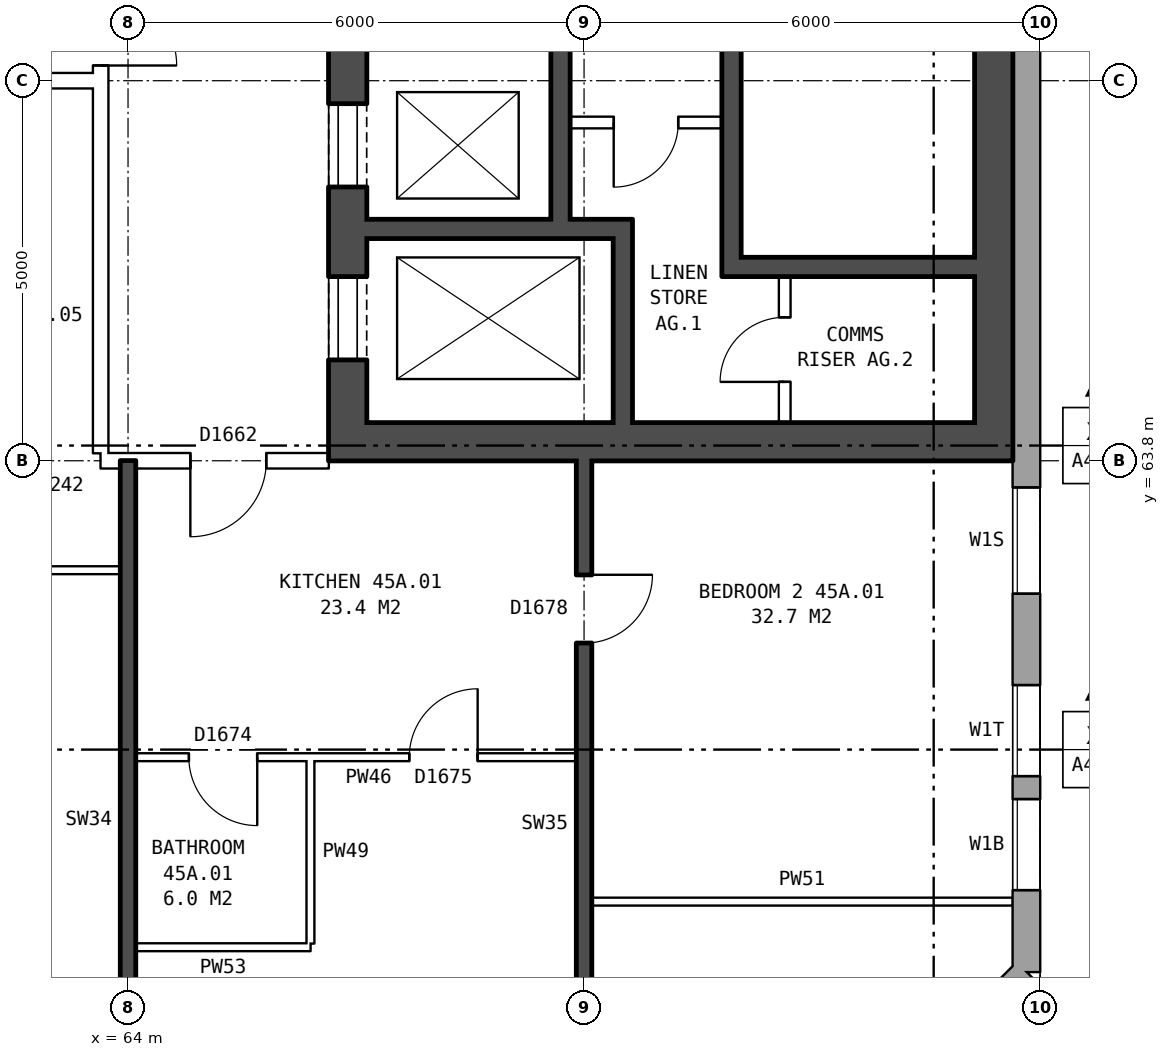
"""IFC4 building model, lengths in metres.
Left out: names, types, materials, properties, quantities, classifications, styles, units other than length and angle.
Written with IfcOpenShell. Run it as: python <this file> out.ifc"""

import sys

from ifc_helpers import new_model, si_unit, direction, frame, frame_2d, origin, place, context, subcontext, project, spatial, rectangle, extrude, element, fill, save


model = new_model("IFC4")
c1 = context("Model", 3, precision=1e-05, world=origin(), true_north=direction((0.0, 1.0)))
c2 = subcontext(c1, "Body", "Model", "MODEL_VIEW")
j1 = project(units=[si_unit("LENGTHUNIT", "METRE"), si_unit("PLANEANGLEUNIT", "RADIAN")], contexts=[c1])
p1 = place(None, origin())
s1 = spatial("IfcSite", under=j1, at=p1, CompositionType="ELEMENT")
p2 = place(p1, origin())
s2 = spatial("IfcBuilding", under=s1, at=p2, CompositionType="ELEMENT")
p3 = place(p2, frame((0.0, 0.0, 160.9)))
s3 = spatial("IfcBuildingStorey", under=s2, at=p3, CompositionType="ELEMENT", Elevation=160.9)
p4 = place(p3, frame((72.925, 54.18, 0.0), z_axis=(0.0, 0.0, 1.0), x_axis=(0.707106781187, 0.707106781187, 0.0)))
e1 = element("IfcWall", 1, at=p4, inside=s3, PredefinedType="STANDARD", context=c2, shape_type="SweptSolid", body=[
    extrude(rectangle(XDim=4.094, YDim=0.36, at=frame_2d((2.047, 0.0))), origin(), (0.0, 0.0, 1.0), 2.85),
])
p5 = place(p4, frame((1.247, 0.0, 0.8)))
e2 = element("IfcOpeningElement", 2, at=p5, cuts=e1, PredefinedType="OPENING", context=c2, shape_type="SweptSolid", body=[
    extrude(rectangle(XDim=1.6, YDim=1.8, at=frame_2d((0.8, 0.9))), frame((0.0, 0.19, 0.0), z_axis=(0.0, -1.0, 0.0), x_axis=(1.0, 0.0, 0.0)), (0.0, 0.0, 1.0), 0.38),
])
p6 = place(p3, frame((75.82, 57.075, 0.0), z_axis=(0.0, 0.0, 1.0), x_axis=(0.0, 1.0, 0.0)))
e3 = element("IfcWall", 3, at=p6, inside=s3, PredefinedType="STANDARD", context=c2, shape_type="SweptSolid", body=[
    extrude(rectangle(XDim=25.851, YDim=0.36, at=frame_2d((12.925, 0.0))), origin(), (0.0, 0.0, 1.0), 2.85),
])
p7 = place(p6, frame((1.075, 0.0, 0.8)))
e4 = element("IfcOpeningElement", 4, at=p7, cuts=e3, PredefinedType="OPENING", context=c2, shape_type="SweptSolid", body=[
    extrude(rectangle(XDim=1.2, YDim=1.8, at=frame_2d((0.6, 0.9))), frame((0.0, 0.19, 0.0), z_axis=(0.0, -1.0, 0.0), x_axis=(1.0, 0.0, 0.0)), (0.0, 0.0, 1.0), 0.38),
])
p8 = place(p6, frame((2.575, 0.0, 0.8)))
e5 = element("IfcOpeningElement", 5, at=p8, cuts=e3, PredefinedType="OPENING", context=c2, shape_type="SweptSolid", body=[
    extrude(rectangle(XDim=1.2, YDim=0.9, at=frame_2d((0.6, 0.45))), frame((0.0, 0.19, 0.0), z_axis=(0.0, -1.0, 0.0), x_axis=(1.0, 0.0, 0.0)), (0.0, 0.0, 1.0), 0.38),
])
p9 = place(p6, frame((19.475, 0.0, 1.7)))
e6 = element("IfcOpeningElement", 6, at=p9, cuts=e3, PredefinedType="OPENING", context=c2, shape_type="SweptSolid", body=[
    extrude(rectangle(XDim=1.4, YDim=0.9, at=frame_2d((0.7, 0.45))), frame((0.0, 0.19, 0.0), z_axis=(0.0, -1.0, 0.0), x_axis=(1.0, 0.0, 0.0)), (0.0, 0.0, 1.0), 0.38),
])
p10 = place(p6, frame((21.925, 0.0, 0.8)))
e7 = element("IfcOpeningElement", 7, at=p10, cuts=e3, PredefinedType="OPENING", context=c2, shape_type="SweptSolid", body=[
    extrude(rectangle(XDim=1.2, YDim=0.9, at=frame_2d((0.6, 0.45))), frame((0.0, 0.19, 0.0), z_axis=(0.0, -1.0, 0.0), x_axis=(1.0, 0.0, 0.0)), (0.0, 0.0, 1.0), 0.38),
])
p11 = place(p6, frame((4.975, 0.0, 1.7)))
e8 = element("IfcOpeningElement", 8, at=p11, cuts=e3, PredefinedType="OPENING", context=c2, shape_type="SweptSolid", body=[
    extrude(rectangle(XDim=1.4, YDim=0.9, at=frame_2d((0.7, 0.45))), frame((0.0, 0.19, 0.0), z_axis=(0.0, -1.0, 0.0), x_axis=(1.0, 0.0, 0.0)), (0.0, 0.0, 1.0), 0.38),
])
p12 = place(p6, frame((23.475, 0.0, 0.8)))
e9 = element("IfcOpeningElement", 9, at=p12, cuts=e3, PredefinedType="OPENING", context=c2, shape_type="SweptSolid", body=[
    extrude(rectangle(XDim=1.2, YDim=1.8, at=frame_2d((0.6, 0.9))), frame((0.0, 0.19, 0.0), z_axis=(0.0, -1.0, 0.0), x_axis=(1.0, 0.0, 0.0)), (0.0, 0.0, 1.0), 0.38),
])
p13 = place(p3, frame((66.89, 63.8, 0.0), z_axis=(0.0, 0.0, 1.0), x_axis=(0.0, 1.0, 0.0)))
e10 = element("IfcWall", 10, at=p13, inside=s3, PredefinedType="SHEAR", context=c2, shape_type="SweptSolid", body=[
    extrude(rectangle(XDim=12.4, YDim=0.5, at=frame_2d((6.2, 0.0))), origin(), (0.0, 0.0, 1.0), 2.85),
])
p14 = place(p13, frame((1.325, 0.0, 0.0)))
e11 = element("IfcOpeningElement", 11, at=p14, cuts=e10, PredefinedType="OPENING", context=c2, shape_type="SweptSolid", body=[
    extrude(rectangle(XDim=1.1, YDim=2.1, at=frame_2d((0.55, 1.05))), frame((0.0, 0.26, 0.0), z_axis=(0.0, -1.0, 0.0), x_axis=(1.0, 0.0, 0.0)), (0.0, 0.0, 1.0), 0.52),
])
p15 = place(p13, frame((3.6, 0.0, 0.0)))
e12 = element("IfcOpeningElement", 12, at=p15, cuts=e10, PredefinedType="OPENING", context=c2, shape_type="SweptSolid", body=[
    extrude(rectangle(XDim=1.1, YDim=2.1, at=frame_2d((0.55, 1.05))), frame((0.0, 0.26, 0.0), z_axis=(0.0, -1.0, 0.0), x_axis=(1.0, 0.0, 0.0)), (0.0, 0.0, 1.0), 0.52),
])
p16 = place(p13, frame((5.8, 0.0, 0.0)))
e13 = element("IfcOpeningElement", 13, at=p16, cuts=e10, PredefinedType="OPENING", context=c2, shape_type="SweptSolid", body=[
    extrude(rectangle(XDim=1.1, YDim=2.1, at=frame_2d((0.55, 1.05))), frame((0.0, 0.26, 0.0), z_axis=(0.0, -1.0, 0.0), x_axis=(1.0, 0.0, 0.0)), (0.0, 0.0, 1.0), 0.52),
])
p17 = place(p13, frame((8.0, 0.0, 0.0)))
e14 = element("IfcOpeningElement", 14, at=p17, cuts=e10, PredefinedType="OPENING", context=c2, shape_type="SweptSolid", body=[
    extrude(rectangle(XDim=1.1, YDim=2.1, at=frame_2d((0.55, 1.05))), frame((0.0, 0.26, 0.0), z_axis=(0.0, -1.0, 0.0), x_axis=(1.0, 0.0, 0.0)), (0.0, 0.0, 1.0), 0.52),
])
p18 = place(p13, frame((9.9, 0.0, 0.0)))
e15 = element("IfcOpeningElement", 15, at=p18, cuts=e10, PredefinedType="OPENING", context=c2, shape_type="SweptSolid", body=[
    extrude(rectangle(XDim=1.1, YDim=2.1, at=frame_2d((0.55, 1.05))), frame((0.0, 0.26, 0.0), z_axis=(0.0, -1.0, 0.0), x_axis=(1.0, 0.0, 0.0)), (0.0, 0.0, 1.0), 0.52),
])
p19 = place(p3, frame((75.39, 63.8, 0.0), z_axis=(0.0, 0.0, 1.0), x_axis=(0.0, 1.0, 0.0)))
e16 = element("IfcWall", 16, at=p19, inside=s3, PredefinedType="SHEAR", context=c2, shape_type="SweptSolid", body=[
    extrude(rectangle(XDim=12.4, YDim=0.5, at=frame_2d((6.2, 0.0))), origin(), (0.0, 0.0, 1.0), 2.85),
])
p20 = place(p3, frame((67.14, 64.05, 0.0), z_axis=(0.0, 0.0, 1.0), x_axis=(1.0, 0.0, 0.0)))
e17 = element("IfcWall", 17, at=p20, inside=s3, PredefinedType="SHEAR", context=c2, shape_type="SweptSolid", body=[
    extrude(rectangle(XDim=8.0, YDim=0.5, at=frame_2d((4.0, 0.0))), origin(), (0.0, 0.0, 1.0), 2.85),
])
p21 = place(p3, frame((72.065, 66.35, 0.0), z_axis=(0.0, 0.0, 1.0), x_axis=(1.0, 0.0, 0.0)))
e18 = element("IfcWall", 18, at=p21, inside=s3, PredefinedType="SHEAR", context=c2, shape_type="SweptSolid", body=[
    extrude(rectangle(XDim=3.075, YDim=0.25, at=frame_2d((1.538, 0.0))), origin(), (0.0, 0.0, 1.0), 2.85),
])
p22 = place(p3, frame((67.14, 66.85, 0.0), z_axis=(0.0, 0.0, 1.0), x_axis=(1.0, 0.0, 0.0)))
e19 = element("IfcWall", 19, at=p22, inside=s3, PredefinedType="SHEAR", context=c2, shape_type="SweptSolid", body=[
    extrude(rectangle(XDim=3.495, YDim=0.25, at=frame_2d((1.748, 0.0))), origin(), (0.0, 0.0, 1.0), 2.85),
])
p23 = place(p3, frame((69.815, 68.25, 0.0), z_axis=(0.0, 0.0, 1.0), x_axis=(1.0, 0.0, 0.0)))
e20 = element("IfcWall", 20, at=p23, inside=s3, PredefinedType="PARTITIONING", context=c2, shape_type="SweptSolid", body=[
    extrude(rectangle(XDim=2.0, YDim=0.15, at=frame_2d((1.0, 0.0))), origin(), (0.0, 0.0, 1.0), 2.85),
])
p24 = place(p23, frame((0.575, 0.0, 0.0)))
e21 = element("IfcOpeningElement", 21, at=p24, cuts=e20, PredefinedType="OPENING", context=c2, shape_type="SweptSolid", body=[
    extrude(rectangle(XDim=0.85, YDim=2.1, at=frame_2d((0.425, 1.05))), frame((0.0, 0.085, 0.0), z_axis=(0.0, -1.0, 0.0), x_axis=(1.0, 0.0, 0.0)), (0.0, 0.0, 1.0), 0.17),
])
p25 = place(p3, frame((69.69, 66.975, 0.0), z_axis=(0.0, 0.0, 1.0), x_axis=(0.0, 1.0, 0.0)))
e22 = element("IfcWall", 22, at=p25, inside=s3, PredefinedType="SHEAR", context=c2, shape_type="SweptSolid", body=[
    extrude(rectangle(XDim=6.6, YDim=0.25, at=frame_2d((3.3, 0.0))), origin(), (0.0, 0.0, 1.0), 2.85),
])
p26 = place(p3, frame((70.51, 64.3, 0.0), z_axis=(0.0, 0.0, 1.0), x_axis=(0.0, 1.0, 0.0)))
e23 = element("IfcWall", 23, at=p26, inside=s3, PredefinedType="SHEAR", context=c2, shape_type="SweptSolid", body=[
    extrude(rectangle(XDim=2.425, YDim=0.25, at=frame_2d((1.212, 0.0))), origin(), (0.0, 0.0, 1.0), 2.85),
])
p27 = place(p3, frame((71.94, 66.225, 0.0), z_axis=(0.0, 0.0, 1.0), x_axis=(0.0, 1.0, 0.0)))
e24 = element("IfcWall", 24, at=p27, inside=s3, PredefinedType="SHEAR", context=c2, shape_type="SweptSolid", body=[
    extrude(rectangle(XDim=7.35, YDim=0.25, at=frame_2d((3.675, 0.0))), origin(), (0.0, 0.0, 1.0), 2.85),
])
p28 = place(p3, frame((72.64, 64.3, 0.0), z_axis=(0.0, 0.0, 1.0), x_axis=(0.0, 1.0, 0.0)))
e25 = element("IfcWall", 25, at=p28, inside=s3, PredefinedType="PARTITIONING", context=c2, shape_type="SweptSolid", body=[
    extrude(rectangle(XDim=1.925, YDim=0.15, at=frame_2d((0.962, 0.0))), origin(), (0.0, 0.0, 1.0), 2.85),
])
p29 = place(p28, frame((0.538, 0.0, 0.0)))
e26 = element("IfcOpeningElement", 26, at=p29, cuts=e25, PredefinedType="OPENING", context=c2, shape_type="SweptSolid", body=[
    extrude(rectangle(XDim=0.85, YDim=2.1, at=frame_2d((0.425, 1.05))), frame((0.0, 0.085, 0.0), z_axis=(0.0, -1.0, 0.0), x_axis=(1.0, 0.0, 0.0)), (0.0, 0.0, 1.0), 0.17),
])
p30 = place(p3, frame((63.64, 63.9, 0.0), z_axis=(0.0, 0.0, 1.0), x_axis=(0.0, 1.0, 0.0)))
e27 = element("IfcWall", 27, at=p30, inside=s3, PredefinedType="PARTITIONING", context=c2, shape_type="SweptSolid", body=[
    extrude(rectangle(XDim=12.2, YDim=0.2, at=frame_2d((6.1, 0.0))), origin(), (0.0, 0.0, 1.0), 2.85),
])
p31 = place(p30, frame((5.1, 0.0, 0.0)))
e28 = element("IfcOpeningElement", 28, at=p31, cuts=e27, PredefinedType="OPENING", context=c2, shape_type="SweptSolid", body=[
    extrude(rectangle(XDim=2.0, YDim=2.1, at=frame_2d((1.0, 1.05))), frame((0.0, 0.11, 0.0), z_axis=(0.0, -1.0, 0.0), x_axis=(1.0, 0.0, 0.0)), (0.0, 0.0, 1.0), 0.22),
])
p32 = place(p3, frame((64.1, 57.4, 0.0), z_axis=(0.0, 0.0, 1.0), x_axis=(1.0, 0.0, 0.0)))
e29 = element("IfcWall", 29, at=p32, inside=s3, PredefinedType="PARTITIONING", context=c2, shape_type="SweptSolid", body=[
    extrude(rectangle(XDim=2.3, YDim=0.1, at=frame_2d((1.15, 0.0))), origin(), (0.0, 0.0, 1.0), 2.85),
])
p33 = place(p3, frame((70.1, 58.0, 0.0), z_axis=(0.0, 0.0, 1.0), x_axis=(1.0, 0.0, 0.0)))
e30 = element("IfcWall", 30, at=p33, inside=s3, PredefinedType="PARTITIONING", context=c2, shape_type="SweptSolid", body=[
    extrude(rectangle(XDim=5.54, YDim=0.1, at=frame_2d((2.77, 0.0))), origin(), (0.0, 0.0, 1.0), 2.85),
])
p34 = place(p3, frame((64.1, 59.9, 0.0), z_axis=(0.0, 0.0, 1.0), x_axis=(1.0, 0.0, 0.0)))
e31 = element("IfcWall", 31, at=p34, inside=s3, PredefinedType="PARTITIONING", context=c2, shape_type="SweptSolid", body=[
    extrude(rectangle(XDim=5.8, YDim=0.1, at=frame_2d((2.9, 0.0))), origin(), (0.0, 0.0, 1.0), 2.85),
])
p35 = place(p34, frame((3.6, 0.0, 0.0)))
e32 = element("IfcOpeningElement", 32, at=p35, cuts=e31, PredefinedType="OPENING", context=c2, shape_type="SweptSolid", body=[
    extrude(rectangle(XDim=0.9, YDim=2.1, at=frame_2d((0.45, 1.05))), frame((0.0, 0.06, 0.0), z_axis=(0.0, -1.0, 0.0), x_axis=(1.0, 0.0, 0.0)), (0.0, 0.0, 1.0), 0.12),
])
p36 = place(p34, frame((0.7, 0.0, 0.0)))
e33 = element("IfcOpeningElement", 33, at=p36, cuts=e31, PredefinedType="OPENING", context=c2, shape_type="SweptSolid", body=[
    extrude(rectangle(XDim=0.9, YDim=2.1, at=frame_2d((0.45, 1.05))), frame((0.0, 0.06, 0.0), z_axis=(0.0, -1.0, 0.0), x_axis=(1.0, 0.0, 0.0)), (0.0, 0.0, 1.0), 0.12),
])
p37 = place(p3, frame((61.0, 62.36, 0.0), z_axis=(0.0, 0.0, 1.0), x_axis=(1.0, 0.0, 0.0)))
e34 = element("IfcWall", 34, at=p37, inside=s3, PredefinedType="PARTITIONING", context=c2, shape_type="SweptSolid", body=[
    extrude(rectangle(XDim=2.9, YDim=0.1, at=frame_2d((1.45, 0.0))), origin(), (0.0, 0.0, 1.0), 2.85),
])
p38 = place(p37, frame((1.0, 0.0, 0.0)))
e35 = element("IfcOpeningElement", 35, at=p38, cuts=e34, PredefinedType="OPENING", context=c2, shape_type="SweptSolid", body=[
    extrude(rectangle(XDim=0.9, YDim=2.1, at=frame_2d((0.45, 1.05))), frame((0.0, 0.06, 0.0), z_axis=(0.0, -1.0, 0.0), x_axis=(1.0, 0.0, 0.0)), (0.0, 0.0, 1.0), 0.12),
])
p39 = place(p3, frame((63.64, 63.8, 0.0), z_axis=(0.0, 0.0, 1.0), x_axis=(1.0, 0.0, 0.0)))
e36 = element("IfcWall", 36, at=p39, inside=s3, PredefinedType="PARTITIONING", context=c2, shape_type="SweptSolid", body=[
    extrude(rectangle(XDim=3.0, YDim=0.2, at=frame_2d((1.5, 0.0))), origin(), (0.0, 0.0, 1.0), 2.85),
])
p40 = place(p39, frame((1.18, 0.0, 0.0)))
e37 = element("IfcOpeningElement", 37, at=p40, cuts=e36, PredefinedType="OPENING", context=c2, shape_type="SweptSolid", body=[
    extrude(rectangle(XDim=1.0, YDim=2.1, at=frame_2d((0.5, 1.05))), frame((0.0, 0.11, 0.0), z_axis=(0.0, -1.0, 0.0), x_axis=(1.0, 0.0, 0.0)), (0.0, 0.0, 1.0), 0.22),
])
p41 = place(p3, frame((44.36, 68.8, 0.0), z_axis=(0.0, 0.0, 1.0), x_axis=(1.0, 0.0, 0.0)))
e38 = element("IfcWall", 38, at=p41, inside=s3, PredefinedType="PARTITIONING", context=c2, shape_type="SweptSolid", body=[
    extrude(rectangle(XDim=19.28, YDim=0.2, at=frame_2d((9.64, 0.0))), origin(), (0.0, 0.0, 1.0), 2.85),
])
p42 = place(p41, frame((17.46, 0.0, 0.0)))
e39 = element("IfcOpeningElement", 39, at=p42, cuts=e38, PredefinedType="OPENING", context=c2, shape_type="SweptSolid", body=[
    extrude(rectangle(XDim=1.0, YDim=2.1, at=frame_2d((0.5, 1.05))), frame((0.0, 0.11, 0.0), z_axis=(0.0, -1.0, 0.0), x_axis=(1.0, 0.0, 0.0)), (0.0, 0.0, 1.0), 0.22),
])
p43 = place(p41, frame((8.64, 0.0, 0.0)))
e40 = element("IfcOpeningElement", 40, at=p43, cuts=e38, PredefinedType="OPENING", context=c2, shape_type="SweptSolid", body=[
    extrude(rectangle(XDim=1.0, YDim=2.1, at=frame_2d((0.5, 1.05))), frame((0.0, 0.11, 0.0), z_axis=(0.0, -1.0, 0.0), x_axis=(1.0, 0.0, 0.0)), (0.0, 0.0, 1.0), 0.22),
])
p44 = place(p41, frame((2.64, 0.0, 0.0)))
e41 = element("IfcOpeningElement", 41, at=p44, cuts=e38, PredefinedType="OPENING", context=c2, shape_type="SweptSolid", body=[
    extrude(rectangle(XDim=1.0, YDim=2.1, at=frame_2d((0.5, 1.05))), frame((0.0, 0.11, 0.0), z_axis=(0.0, -1.0, 0.0), x_axis=(1.0, 0.0, 0.0)), (0.0, 0.0, 1.0), 0.22),
])
p45 = place(p3, frame((64.0, 54.36, 0.0), z_axis=(0.0, 0.0, 1.0), x_axis=(0.0, 1.0, 0.0)))
e42 = element("IfcWall", 42, at=p45, inside=s3, PredefinedType="SOLIDWALL", context=c2, shape_type="SweptSolid", body=[
    extrude(rectangle(XDim=9.44, YDim=0.2, at=frame_2d((4.72, 0.0))), origin(), (0.0, 0.0, 1.0), 2.85),
])
p46 = place(p3, frame((66.4, 57.45, 0.0), z_axis=(0.0, 0.0, 1.0), x_axis=(0.0, 1.0, 0.0)))
e43 = element("IfcWall", 43, at=p46, inside=s3, PredefinedType="PARTITIONING", context=c2, shape_type="SweptSolid", body=[
    extrude(rectangle(XDim=2.4, YDim=0.1, at=frame_2d((1.2, 0.0))), origin(), (0.0, 0.0, 1.0), 2.85),
])
p47 = place(p3, frame((70.0, 54.36, 0.0), z_axis=(0.0, 0.0, 1.0), x_axis=(0.0, 1.0, 0.0)))
e44 = element("IfcWall", 44, at=p47, inside=s3, PredefinedType="SOLIDWALL", context=c2, shape_type="SweptSolid", body=[
    extrude(rectangle(XDim=9.44, YDim=0.2, at=frame_2d((4.72, 0.0))), origin(), (0.0, 0.0, 1.0), 2.85),
])
p48 = place(p47, frame((1.37, 0.0, 0.0)))
e45 = element("IfcOpeningElement", 45, at=p48, cuts=e44, PredefinedType="OPENING", context=c2, shape_type="SweptSolid", body=[
    extrude(rectangle(XDim=0.9, YDim=2.1, at=frame_2d((0.45, 1.05))), frame((0.0, 0.11, 0.0), z_axis=(0.0, -1.0, 0.0), x_axis=(1.0, 0.0, 0.0)), (0.0, 0.0, 1.0), 0.22),
])
p49 = place(p47, frame((7.04, 0.0, 0.0)))
e46 = element("IfcOpeningElement", 46, at=p49, cuts=e44, PredefinedType="OPENING", context=c2, shape_type="SweptSolid", body=[
    extrude(rectangle(XDim=0.9, YDim=2.1, at=frame_2d((0.45, 1.05))), frame((0.0, 0.11, 0.0), z_axis=(0.0, -1.0, 0.0), x_axis=(1.0, 0.0, 0.0)), (0.0, 0.0, 1.0), 0.22),
])
p50 = place(p7, origin())
e47 = element("IfcWindow", 47, at=p50, inside=s3, PartitioningType="SINGLE_PANEL", PredefinedType="WINDOW", context=c2, shape_type="SweptSolid", body=[
    extrude(rectangle(XDim=1.2, YDim=1.8, at=frame_2d((0.6, 0.9))), frame((0.0, 0.15, 0.0), z_axis=(0.0, -1.0, 0.0), x_axis=(1.0, 0.0, 0.0)), (0.0, 0.0, 1.0), 0.06),
])
fill(e4, e47)
p51 = place(p8, origin())
e48 = element("IfcWindow", 48, at=p51, inside=s3, PartitioningType="SINGLE_PANEL", PredefinedType="WINDOW", context=c2, shape_type="SweptSolid", body=[
    extrude(rectangle(XDim=1.2, YDim=0.9, at=frame_2d((0.6, 0.45))), frame((0.0, 0.15, 0.0), z_axis=(0.0, -1.0, 0.0), x_axis=(1.0, 0.0, 0.0)), (0.0, 0.0, 1.0), 0.06),
])
fill(e5, e48)
p52 = place(p14, origin())
e49 = element("IfcDoor", 49, at=p52, inside=s3, OperationType="DOUBLE_DOOR_SLIDING", PredefinedType="DOOR", context=c2, shape_type="SweptSolid", body=[
    extrude(rectangle(XDim=1.1, YDim=2.1, at=frame_2d((0.55, 1.05))), frame((0.0, -0.185, 0.0), z_axis=(0.0, -1.0, 0.0), x_axis=(1.0, 0.0, 0.0)), (0.0, 0.0, 1.0), 0.05),
])
fill(e11, e49)
p53 = place(p15, origin())
e50 = element("IfcDoor", 50, at=p53, inside=s3, OperationType="DOUBLE_DOOR_SLIDING", PredefinedType="DOOR", context=c2, shape_type="SweptSolid", body=[
    extrude(rectangle(XDim=1.1, YDim=2.1, at=frame_2d((0.55, 1.05))), frame((0.0, -0.185, 0.0), z_axis=(0.0, -1.0, 0.0), x_axis=(1.0, 0.0, 0.0)), (0.0, 0.0, 1.0), 0.05),
])
fill(e12, e50)
p54 = place(p24, frame((0.85, 0.0, 0.0), z_axis=(0.0, 0.0, 1.0), x_axis=(-1.0, 0.0, 0.0)))
e51 = element("IfcDoor", 51, at=p54, inside=s3, OperationType="SINGLE_SWING_RIGHT", PredefinedType="DOOR", context=c2, shape_type="SweptSolid", body=[
    extrude(rectangle(XDim=0.85, YDim=2.1, at=frame_2d((0.425, 1.05))), frame((0.0, 0.025, 0.0), z_axis=(0.0, -1.0, 0.0), x_axis=(1.0, 0.0, 0.0)), (0.0, 0.0, 1.0), 0.05),
])
fill(e21, e51)
p55 = place(p29, origin())
e52 = element("IfcDoor", 52, at=p55, inside=s3, OperationType="SINGLE_SWING_LEFT", PredefinedType="DOOR", context=c2, shape_type="SweptSolid", body=[
    extrude(rectangle(XDim=0.85, YDim=2.1, at=frame_2d((0.425, 1.05))), frame((0.0, 0.025, 0.0), z_axis=(0.0, -1.0, 0.0), x_axis=(1.0, 0.0, 0.0)), (0.0, 0.0, 1.0), 0.05),
])
fill(e26, e52)
p56 = place(p31, frame((2.0, 0.0, 0.0), z_axis=(0.0, 0.0, 1.0), x_axis=(-1.0, 0.0, 0.0)))
e53 = element("IfcDoor", 53, at=p56, inside=s3, OperationType="DOUBLE_DOOR_SINGLE_SWING", PredefinedType="DOOR", context=c2, shape_type="SweptSolid", body=[
    extrude(rectangle(XDim=2.0, YDim=2.1, at=frame_2d((1.0, 1.05))), frame((0.0, 0.025, 0.0), z_axis=(0.0, -1.0, 0.0), x_axis=(1.0, 0.0, 0.0)), (0.0, 0.0, 1.0), 0.05),
])
fill(e28, e53)
p57 = place(p49, frame((0.9, 0.0, 0.0), z_axis=(0.0, 0.0, 1.0), x_axis=(-1.0, 0.0, 0.0)))
e54 = element("IfcDoor", 54, at=p57, inside=s3, OperationType="SINGLE_SWING_LEFT", PredefinedType="DOOR", context=c2, shape_type="SweptSolid", body=[
    extrude(rectangle(XDim=0.9, YDim=2.1, at=frame_2d((0.45, 1.05))), frame((0.0, 0.025, 0.0), z_axis=(0.0, -1.0, 0.0), x_axis=(1.0, 0.0, 0.0)), (0.0, 0.0, 1.0), 0.05),
])
fill(e46, e54)
p58 = place(p40, frame((1.0, 0.0, 0.0), z_axis=(0.0, 0.0, 1.0), x_axis=(-1.0, 0.0, 0.0)))
e55 = element("IfcDoor", 55, at=p58, inside=s3, OperationType="SINGLE_SWING_RIGHT", PredefinedType="DOOR", context=c2, shape_type="SweptSolid", body=[
    extrude(rectangle(XDim=1.0, YDim=2.1, at=frame_2d((0.5, 1.05))), frame((0.0, 0.025, 0.0), z_axis=(0.0, -1.0, 0.0), x_axis=(1.0, 0.0, 0.0)), (0.0, 0.0, 1.0), 0.05),
])
fill(e37, e55)
p59 = place(p35, origin())
e56 = element("IfcDoor", 56, at=p59, inside=s3, OperationType="SINGLE_SWING_RIGHT", PredefinedType="DOOR", context=c2, shape_type="SweptSolid", body=[
    extrude(rectangle(XDim=0.9, YDim=2.1, at=frame_2d((0.45, 1.05))), frame((0.0, 0.025, 0.0), z_axis=(0.0, -1.0, 0.0), x_axis=(1.0, 0.0, 0.0)), (0.0, 0.0, 1.0), 0.05),
])
fill(e32, e56)
p60 = place(p36, frame((0.9, 0.0, 0.0), z_axis=(0.0, 0.0, 1.0), x_axis=(-1.0, 0.0, 0.0)))
e57 = element("IfcDoor", 57, at=p60, inside=s3, OperationType="SINGLE_SWING_LEFT", PredefinedType="DOOR", context=c2, shape_type="SweptSolid", body=[
    extrude(rectangle(XDim=0.9, YDim=2.1, at=frame_2d((0.45, 1.05))), frame((0.0, 0.025, 0.0), z_axis=(0.0, -1.0, 0.0), x_axis=(1.0, 0.0, 0.0)), (0.0, 0.0, 1.0), 0.05),
])
fill(e33, e57)
p61 = place(p11, origin())
e58 = element("IfcWindow", 58, at=p61, inside=s3, PartitioningType="SINGLE_PANEL", PredefinedType="WINDOW", context=c2, shape_type="SweptSolid", body=[
    extrude(rectangle(XDim=1.4, YDim=0.9, at=frame_2d((0.7, 0.45))), frame((0.0, 0.15, 0.0), z_axis=(0.0, -1.0, 0.0), x_axis=(1.0, 0.0, 0.0)), (0.0, 0.0, 1.0), 0.06),
])
fill(e8, e58)
save(model, sys.argv[1])
